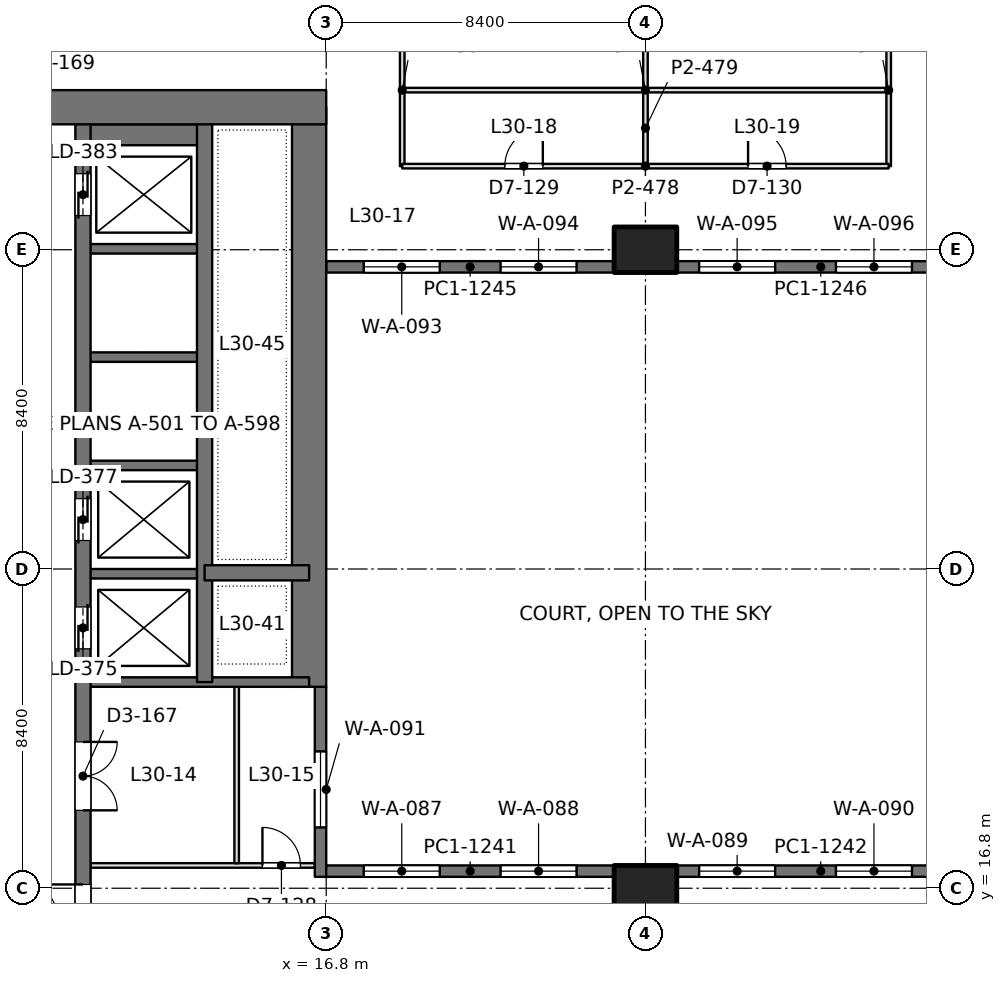
"""IFC4 building model, lengths in metres.
Left out: names, types, materials, properties, quantities, classifications, styles, units other than length and angle.
Written with IfcOpenShell. Run it as: python <this file> out.ifc"""

import sys

from ifc_helpers import new_model, si_unit, direction, frame, frame_2d, origin, origin_2d, place, context, subcontext, project, spatial, rectangle, extrude, element, fill, save


model = new_model("IFC4")
c1 = context("Model", 3, precision=1e-05, world=origin(), true_north=direction((0.0, 1.0)))
c2 = subcontext(c1, "Body", "Model", "MODEL_VIEW")
j1 = project(units=[si_unit("LENGTHUNIT", "METRE"), si_unit("PLANEANGLEUNIT", "RADIAN")], contexts=[c1])
p1 = place(None, origin())
s1 = spatial("IfcSite", under=j1, at=p1, CompositionType="ELEMENT")
p2 = place(p1, origin())
s2 = spatial("IfcBuilding", under=s1, at=p2, CompositionType="ELEMENT")
p3 = place(p2, frame((0.0, 0.0, 134.4)))
s3 = spatial("IfcBuildingStorey", under=s2, at=p3, CompositionType="ELEMENT", Elevation=134.4)
for number, where, z_axis, x_axis in (
    (1, (25.2, 16.8, 0.0), (0.0, 0.0, 1.0), (1.0, 0.0, 0.0)),
    (2, (25.2, 33.6, 0.0), (0.0, 0.0, 1.0), (1.0, 0.0, 0.0)),
):
    element("IfcColumn", number, at=place(p3, frame(where, z_axis=z_axis, x_axis=x_axis)), inside=s3, PredefinedType="COLUMN", context=c2, shape_type="SweptSolid", body=[
        extrude(rectangle(XDim=1.65, YDim=1.2, at=origin_2d()), origin(), (0.0, 0.0, 1.0), 4.2),
    ])
p4 = place(p3, frame((-1.2, 37.35, 0.0), z_axis=(0.0, 0.0, 1.0), x_axis=(1.0, 0.0, 0.0)))
e3 = element("IfcWall", 3, at=p4, inside=s3, PredefinedType="SHEAR", context=c2, shape_type="SweptSolid", body=[
    extrude(rectangle(XDim=18.0, YDim=0.9, at=frame_2d((9.0, 0.0))), origin(), (0.0, 0.0, 1.0), 4.2),
])
p5 = place(p4, frame((8.95, 0.0, 0.0)))
e4 = element("IfcOpeningElement", 4, at=p5, cuts=e3, PredefinedType="OPENING", context=c2, shape_type="SweptSolid", body=[
    extrude(rectangle(XDim=1.8, YDim=2.4, at=frame_2d((0.9, 1.2))), frame((0.0, 0.46, 0.0), z_axis=(0.0, -1.0, 0.0), x_axis=(1.0, 0.0, 0.0)), (0.0, 0.0, 1.0), 0.92),
])
p6 = place(p3, frame((16.35, 22.1, 0.0), z_axis=(0.0, 0.0, 1.0), x_axis=(0.0, 1.0, 0.0)))
e5 = element("IfcWall", 5, at=p6, inside=s3, PredefinedType="SHEAR", context=c2, shape_type="SweptSolid", body=[
    extrude(rectangle(XDim=15.25, YDim=0.9, at=frame_2d((7.625, 0.0))), origin(), (0.0, 0.0, 1.0), 4.2),
])
p7 = place(p3, frame((10.4, 13.05, 0.0), z_axis=(0.0, 0.0, 1.0), x_axis=(0.0, 1.0, 0.0)))
e6 = element("IfcWall", 6, at=p7, inside=s3, PredefinedType="SHEAR", context=c2, shape_type="SweptSolid", body=[
    extrude(rectangle(XDim=24.3, YDim=0.4, at=frame_2d((12.15, 0.0))), origin(), (0.0, 0.0, 1.0), 4.2),
])
p8 = place(p7, frame((10.05, 0.0, 0.0)))
e7 = element("IfcOpeningElement", 7, at=p8, cuts=e6, PredefinedType="OPENING", context=c2, shape_type="SweptSolid", body=[
    extrude(rectangle(XDim=1.1, YDim=2.2, at=frame_2d((0.55, 1.1))), frame((0.0, 0.21, 0.0), z_axis=(0.0, -1.0, 0.0), x_axis=(1.0, 0.0, 0.0)), (0.0, 0.0, 1.0), 0.42),
])
p9 = place(p7, frame((12.9, 0.0, 0.0)))
e8 = element("IfcOpeningElement", 8, at=p9, cuts=e6, PredefinedType="OPENING", context=c2, shape_type="SweptSolid", body=[
    extrude(rectangle(XDim=1.1, YDim=2.2, at=frame_2d((0.55, 1.1))), frame((0.0, 0.21, 0.0), z_axis=(0.0, -1.0, 0.0), x_axis=(1.0, 0.0, 0.0)), (0.0, 0.0, 1.0), 0.42),
])
p10 = place(p7, frame((21.45, 0.0, 0.0)))
e9 = element("IfcOpeningElement", 9, at=p10, cuts=e6, PredefinedType="OPENING", context=c2, shape_type="SweptSolid", body=[
    extrude(rectangle(XDim=1.1, YDim=2.2, at=frame_2d((0.55, 1.1))), frame((0.0, 0.21, 0.0), z_axis=(0.0, -1.0, 0.0), x_axis=(1.0, 0.0, 0.0)), (0.0, 0.0, 1.0), 0.42),
])
p11 = place(p7, frame((2.05, 0.0, 0.0)))
e10 = element("IfcOpeningElement", 10, at=p11, cuts=e6, PredefinedType="OPENING", context=c2, shape_type="SweptSolid", body=[
    extrude(rectangle(XDim=1.8, YDim=2.4, at=frame_2d((0.9, 1.2))), frame((0.0, 0.21, 0.0), z_axis=(0.0, -1.0, 0.0), x_axis=(1.0, 0.0, 0.0)), (0.0, 0.0, 1.0), 0.42),
])
p12 = place(p7, frame((5.8, 0.0, 0.0)))
e11 = element("IfcOpeningElement", 11, at=p12, cuts=e6, PredefinedType="OPENING", context=c2, shape_type="SweptSolid", body=[
    extrude(rectangle(XDim=1.8, YDim=2.4, at=frame_2d((0.9, 1.2))), frame((0.0, 0.21, 0.0), z_axis=(0.0, -1.0, 0.0), x_axis=(1.0, 0.0, 0.0)), (0.0, 0.0, 1.0), 0.42),
])
p13 = place(p3, frame((13.6, 22.225, 0.0), z_axis=(0.0, 0.0, 1.0), x_axis=(0.0, 1.0, 0.0)))
e12 = element("IfcWall", 12, at=p13, inside=s3, PredefinedType="SHEAR", context=c2, shape_type="SweptSolid", body=[
    extrude(rectangle(XDim=15.125, YDim=0.4, at=frame_2d((7.562, 0.0))), origin(), (0.0, 0.0, 1.0), 4.2),
])
p14 = place(p3, frame((13.6, 25.1, 0.0), z_axis=(0.0, 0.0, 1.0), x_axis=(1.0, 0.0, 0.0)))
e13 = element("IfcWall", 13, at=p14, inside=s3, PredefinedType="SHEAR", context=c2, shape_type="SweptSolid", body=[
    extrude(rectangle(XDim=2.75, YDim=0.4, at=frame_2d((1.375, 0.0))), origin(), (0.0, 0.0, 1.0), 4.2),
])
p15 = place(p3, frame((10.4, 22.225, 0.0), z_axis=(0.0, 0.0, 1.0), x_axis=(1.0, 0.0, 0.0)))
e14 = element("IfcWall", 14, at=p15, inside=s3, PredefinedType="SHEAR", context=c2, shape_type="SweptSolid", body=[
    extrude(rectangle(XDim=5.95, YDim=0.25, at=frame_2d((2.975, 0.0))), origin(), (0.0, 0.0, 1.0), 4.2),
])
for number, where, z_axis, x_axis in (
    (15, (10.4, 25.075, 0.0), (0.0, 0.0, 1.0), (1.0, 0.0, 0.0)),
    (16, (10.4, 27.925, 0.0), (0.0, 0.0, 1.0), (1.0, 0.0, 0.0)),
    (17, (10.4, 30.775, 0.0), (0.0, 0.0, 1.0), (1.0, 0.0, 0.0)),
    (18, (10.4, 33.625, 0.0), (0.0, 0.0, 1.0), (1.0, 0.0, 0.0)),
):
    element("IfcWall", number, at=place(p3, frame(where, z_axis=z_axis, x_axis=x_axis)), inside=s3, PredefinedType="SHEAR", context=c2, shape_type="SweptSolid", body=[
        extrude(rectangle(XDim=3.2, YDim=0.25, at=frame_2d((1.6, 0.0))), origin(), (0.0, 0.0, 1.0), 4.2),
    ])
p16 = place(p3, frame((10.4, 36.625, 0.0), z_axis=(0.0, 0.0, 1.0), x_axis=(1.0, 0.0, 0.0)))
e19 = element("IfcWall", 19, at=p16, inside=s3, PredefinedType="SHEAR", context=c2, shape_type="SweptSolid", body=[
    extrude(rectangle(XDim=3.2, YDim=0.55, at=frame_2d((1.6, 0.0))), origin(), (0.0, 0.0, 1.0), 4.2),
])
p17 = place(p3, frame((16.65, 17.1, 0.0), z_axis=(0.0, 0.0, 1.0), x_axis=(0.0, 1.0, 0.0)))
e20 = element("IfcWall", 20, at=p17, inside=s3, PredefinedType="SOLIDWALL", context=c2, shape_type="SweptSolid", body=[
    extrude(rectangle(XDim=5.0, YDim=0.3, at=frame_2d((2.5, 0.0))), origin(), (0.0, 0.0, 1.0), 4.05),
])
p18 = place(p17, frame((1.3, 0.0, 0.1)))
e21 = element("IfcOpeningElement", 21, at=p18, cuts=e20, PredefinedType="OPENING", context=c2, shape_type="SweptSolid", body=[
    extrude(rectangle(XDim=2.0, YDim=3.0, at=frame_2d((1.0, 1.5))), frame((0.0, 0.16, 0.0), z_axis=(0.0, -1.0, 0.0), x_axis=(1.0, 0.0, 0.0)), (0.0, 0.0, 1.0), 0.32),
])
p19 = place(p3, frame((16.8, 17.25, 0.0), z_axis=(0.0, 0.0, 1.0), x_axis=(1.0, 0.0, 0.0)))
e22 = element("IfcWall", 22, at=p19, inside=s3, PredefinedType="SOLIDWALL", context=c2, shape_type="SweptSolid", body=[
    extrude(rectangle(XDim=7.575, YDim=0.3, at=frame_2d((3.788, 0.0))), origin(), (0.0, 0.0, 1.0), 4.05),
])
p20 = place(p19, frame((0.988, 0.0, 0.1)))
e23 = element("IfcOpeningElement", 23, at=p20, cuts=e22, PredefinedType="OPENING", context=c2, shape_type="SweptSolid", body=[
    extrude(rectangle(XDim=2.0, YDim=3.0, at=frame_2d((1.0, 1.5))), frame((0.0, 0.16, 0.0), z_axis=(0.0, -1.0, 0.0), x_axis=(1.0, 0.0, 0.0)), (0.0, 0.0, 1.0), 0.32),
])
p21 = place(p19, frame((4.587, 0.0, 0.1)))
e24 = element("IfcOpeningElement", 24, at=p21, cuts=e22, PredefinedType="OPENING", context=c2, shape_type="SweptSolid", body=[
    extrude(rectangle(XDim=2.0, YDim=3.0, at=frame_2d((1.0, 1.5))), frame((0.0, 0.16, 0.0), z_axis=(0.0, -1.0, 0.0), x_axis=(1.0, 0.0, 0.0)), (0.0, 0.0, 1.0), 0.32),
])
p22 = place(p3, frame((26.025, 17.25, 0.0), z_axis=(0.0, 0.0, 1.0), x_axis=(1.0, 0.0, 0.0)))
e25 = element("IfcWall", 25, at=p22, inside=s3, PredefinedType="SOLIDWALL", context=c2, shape_type="SweptSolid", body=[
    extrude(rectangle(XDim=7.575, YDim=0.3, at=frame_2d((3.788, 0.0))), origin(), (0.0, 0.0, 1.0), 4.05),
])
p23 = place(p22, frame((0.587, 0.0, 0.1)))
e26 = element("IfcOpeningElement", 26, at=p23, cuts=e25, PredefinedType="OPENING", context=c2, shape_type="SweptSolid", body=[
    extrude(rectangle(XDim=2.0, YDim=3.0, at=frame_2d((1.0, 1.5))), frame((0.0, 0.16, 0.0), z_axis=(0.0, -1.0, 0.0), x_axis=(1.0, 0.0, 0.0)), (0.0, 0.0, 1.0), 0.32),
])
p24 = place(p22, frame((4.188, 0.0, 0.1)))
e27 = element("IfcOpeningElement", 27, at=p24, cuts=e25, PredefinedType="OPENING", context=c2, shape_type="SweptSolid", body=[
    extrude(rectangle(XDim=2.0, YDim=3.0, at=frame_2d((1.0, 1.5))), frame((0.0, 0.16, 0.0), z_axis=(0.0, -1.0, 0.0), x_axis=(1.0, 0.0, 0.0)), (0.0, 0.0, 1.0), 0.32),
])
p25 = place(p3, frame((16.8, 33.15, 0.0), z_axis=(0.0, 0.0, 1.0), x_axis=(1.0, 0.0, 0.0)))
e28 = element("IfcWall", 28, at=p25, inside=s3, PredefinedType="SOLIDWALL", context=c2, shape_type="SweptSolid", body=[
    extrude(rectangle(XDim=7.575, YDim=0.3, at=frame_2d((3.788, 0.0))), origin(), (0.0, 0.0, 1.0), 4.05),
])
p26 = place(p25, frame((0.988, 0.0, 0.1)))
e29 = element("IfcOpeningElement", 29, at=p26, cuts=e28, PredefinedType="OPENING", context=c2, shape_type="SweptSolid", body=[
    extrude(rectangle(XDim=2.0, YDim=3.0, at=frame_2d((1.0, 1.5))), frame((0.0, 0.16, 0.0), z_axis=(0.0, -1.0, 0.0), x_axis=(1.0, 0.0, 0.0)), (0.0, 0.0, 1.0), 0.32),
])
p27 = place(p25, frame((4.587, 0.0, 0.1)))
e30 = element("IfcOpeningElement", 30, at=p27, cuts=e28, PredefinedType="OPENING", context=c2, shape_type="SweptSolid", body=[
    extrude(rectangle(XDim=2.0, YDim=3.0, at=frame_2d((1.0, 1.5))), frame((0.0, 0.16, 0.0), z_axis=(0.0, -1.0, 0.0), x_axis=(1.0, 0.0, 0.0)), (0.0, 0.0, 1.0), 0.32),
])
p28 = place(p3, frame((26.025, 33.15, 0.0), z_axis=(0.0, 0.0, 1.0), x_axis=(1.0, 0.0, 0.0)))
e31 = element("IfcWall", 31, at=p28, inside=s3, PredefinedType="SOLIDWALL", context=c2, shape_type="SweptSolid", body=[
    extrude(rectangle(XDim=7.575, YDim=0.3, at=frame_2d((3.788, 0.0))), origin(), (0.0, 0.0, 1.0), 4.05),
])
p29 = place(p28, frame((0.587, 0.0, 0.1)))
e32 = element("IfcOpeningElement", 32, at=p29, cuts=e31, PredefinedType="OPENING", context=c2, shape_type="SweptSolid", body=[
    extrude(rectangle(XDim=2.0, YDim=3.0, at=frame_2d((1.0, 1.5))), frame((0.0, 0.16, 0.0), z_axis=(0.0, -1.0, 0.0), x_axis=(1.0, 0.0, 0.0)), (0.0, 0.0, 1.0), 0.32),
])
p30 = place(p28, frame((4.188, 0.0, 0.1)))
e33 = element("IfcOpeningElement", 33, at=p30, cuts=e31, PredefinedType="OPENING", context=c2, shape_type="SweptSolid", body=[
    extrude(rectangle(XDim=2.0, YDim=3.0, at=frame_2d((1.0, 1.5))), frame((0.0, 0.16, 0.0), z_axis=(0.0, -1.0, 0.0), x_axis=(1.0, 0.0, 0.0)), (0.0, 0.0, 1.0), 0.32),
])
p31 = place(p3, frame((10.598, 17.4, 0.0), z_axis=(0.0, 0.0, 1.0), x_axis=(1.0, 0.0, 0.0)))
e34 = element("IfcWall", 34, at=p31, inside=s3, PredefinedType="PARTITIONING", context=c2, shape_type="SweptSolid", body=[
    extrude(rectangle(XDim=5.904, YDim=0.12, at=frame_2d((2.952, 0.0))), origin(), (0.0, 0.0, 1.0), 3.55),
])
p32 = place(p31, frame((4.524, 0.0, 0.0)))
e35 = element("IfcOpeningElement", 35, at=p32, cuts=e34, PredefinedType="OPENING", context=c2, shape_type="SweptSolid", body=[
    extrude(rectangle(XDim=1.0, YDim=2.4, at=frame_2d((0.5, 1.2))), frame((0.0, 0.07, 0.0), z_axis=(0.0, -1.0, 0.0), x_axis=(1.0, 0.0, 0.0)), (0.0, 0.0, 1.0), 0.14),
])
p33 = place(p3, frame((14.444, 17.458, 0.0), z_axis=(0.0, 0.0, 1.0), x_axis=(0.0, 1.0, 0.0)))
e36 = element("IfcWall", 36, at=p33, inside=s3, PredefinedType="PARTITIONING", context=c2, shape_type="SweptSolid", body=[
    extrude(rectangle(XDim=4.644, YDim=0.12, at=frame_2d((2.322, 0.0))), origin(), (0.0, 0.0, 1.0), 3.6),
])
p34 = place(p3, frame((25.2, 37.858, 0.0), z_axis=(0.0, 0.0, 1.0), x_axis=(0.0, 1.0, 0.0)))
e37 = element("IfcWall", 37, at=p34, inside=s3, PredefinedType="PARTITIONING", context=c2, shape_type="SweptSolid", body=[
    extrude(rectangle(XDim=3.443, YDim=0.12, at=frame_2d((1.722, 0.0))), origin(), (0.0, 0.0, 1.0), 3.55),
])
for number, where, z_axis, x_axis in (
    (38, (18.8, 35.8, 0.0), (0.0, 0.0, 1.0), (0.0, 1.0, 0.0)),
    (39, (31.6, 35.8, 0.0), (0.0, 0.0, 1.0), (0.0, 1.0, 0.0)),
):
    element("IfcWall", number, at=place(p3, frame(where, z_axis=z_axis, x_axis=x_axis)), inside=s3, PredefinedType="PARTITIONING", context=c2, shape_type="SweptSolid", body=[
        extrude(rectangle(XDim=4.0, YDim=0.12, at=frame_2d((2.0, 0.0))), origin(), (0.0, 0.0, 1.0), 4.05),
    ])
p35 = place(p3, frame((25.2, 35.858, 0.0), z_axis=(0.0, 0.0, 1.0), x_axis=(0.0, 1.0, 0.0)))
e40 = element("IfcWall", 40, at=p35, inside=s3, PredefinedType="PARTITIONING", context=c2, shape_type="SweptSolid", body=[
    extrude(rectangle(XDim=1.884, YDim=0.12, at=frame_2d((0.942, 0.0))), origin(), (0.0, 0.0, 1.0), 3.55),
])
p36 = place(p3, frame((18.8, 35.8, 0.0), z_axis=(0.0, 0.0, 1.0), x_axis=(1.0, 0.0, 0.0)))
e41 = element("IfcWall", 41, at=p36, inside=s3, PredefinedType="PARTITIONING", context=c2, shape_type="SweptSolid", body=[
    extrude(rectangle(XDim=12.8, YDim=0.12, at=frame_2d((6.4, 0.0))), origin(), (0.0, 0.0, 1.0), 3.55),
])
p37 = place(p36, frame((2.7, 0.0, 0.0)))
e42 = element("IfcOpeningElement", 42, at=p37, cuts=e41, PredefinedType="OPENING", context=c2, shape_type="SweptSolid", body=[
    extrude(rectangle(XDim=1.0, YDim=2.4, at=frame_2d((0.5, 1.2))), frame((0.0, 0.07, 0.0), z_axis=(0.0, -1.0, 0.0), x_axis=(1.0, 0.0, 0.0)), (0.0, 0.0, 1.0), 0.14),
])
p38 = place(p36, frame((9.1, 0.0, 0.0)))
e43 = element("IfcOpeningElement", 43, at=p38, cuts=e41, PredefinedType="OPENING", context=c2, shape_type="SweptSolid", body=[
    extrude(rectangle(XDim=1.0, YDim=2.4, at=frame_2d((0.5, 1.2))), frame((0.0, 0.07, 0.0), z_axis=(0.0, -1.0, 0.0), x_axis=(1.0, 0.0, 0.0)), (0.0, 0.0, 1.0), 0.14),
])
p39 = place(p3, frame((18.858, 37.8, 0.0), z_axis=(0.0, 0.0, 1.0), x_axis=(1.0, 0.0, 0.0)))
e44 = element("IfcWall", 44, at=p39, inside=s3, PredefinedType="PARTITIONING", context=c2, shape_type="SweptSolid", body=[
    extrude(rectangle(XDim=12.684, YDim=0.12, at=frame_2d((6.342, 0.0))), origin(), (0.0, 0.0, 1.0), 3.55),
])
p40 = place(p18, origin())
e45 = element("IfcWindow", 45, at=p40, inside=s3, PartitioningType="SINGLE_PANEL", PredefinedType="WINDOW", context=c2, shape_type="SweptSolid", body=[
    extrude(rectangle(XDim=2.0, YDim=3.0, at=frame_2d((1.0, 1.5))), frame((0.0, 0.03, 0.0), z_axis=(0.0, -1.0, 0.0), x_axis=(1.0, 0.0, 0.0)), (0.0, 0.0, 1.0), 0.06),
])
fill(e21, e45)
p41 = place(p20, origin())
e46 = element("IfcWindow", 46, at=p41, inside=s3, PartitioningType="SINGLE_PANEL", PredefinedType="WINDOW", context=c2, shape_type="SweptSolid", body=[
    extrude(rectangle(XDim=2.0, YDim=3.0, at=frame_2d((1.0, 1.5))), frame((0.0, 0.03, 0.0), z_axis=(0.0, -1.0, 0.0), x_axis=(1.0, 0.0, 0.0)), (0.0, 0.0, 1.0), 0.06),
])
fill(e23, e46)
p42 = place(p21, origin())
e47 = element("IfcWindow", 47, at=p42, inside=s3, PartitioningType="SINGLE_PANEL", PredefinedType="WINDOW", context=c2, shape_type="SweptSolid", body=[
    extrude(rectangle(XDim=2.0, YDim=3.0, at=frame_2d((1.0, 1.5))), frame((0.0, 0.03, 0.0), z_axis=(0.0, -1.0, 0.0), x_axis=(1.0, 0.0, 0.0)), (0.0, 0.0, 1.0), 0.06),
])
fill(e24, e47)
p43 = place(p23, origin())
e48 = element("IfcWindow", 48, at=p43, inside=s3, PartitioningType="SINGLE_PANEL", PredefinedType="WINDOW", context=c2, shape_type="SweptSolid", body=[
    extrude(rectangle(XDim=2.0, YDim=3.0, at=frame_2d((1.0, 1.5))), frame((0.0, 0.03, 0.0), z_axis=(0.0, -1.0, 0.0), x_axis=(1.0, 0.0, 0.0)), (0.0, 0.0, 1.0), 0.06),
])
fill(e26, e48)
p44 = place(p24, origin())
e49 = element("IfcWindow", 49, at=p44, inside=s3, PartitioningType="SINGLE_PANEL", PredefinedType="WINDOW", context=c2, shape_type="SweptSolid", body=[
    extrude(rectangle(XDim=2.0, YDim=3.0, at=frame_2d((1.0, 1.5))), frame((0.0, 0.03, 0.0), z_axis=(0.0, -1.0, 0.0), x_axis=(1.0, 0.0, 0.0)), (0.0, 0.0, 1.0), 0.06),
])
fill(e27, e49)
p45 = place(p26, origin())
e50 = element("IfcWindow", 50, at=p45, inside=s3, PartitioningType="SINGLE_PANEL", PredefinedType="WINDOW", context=c2, shape_type="SweptSolid", body=[
    extrude(rectangle(XDim=2.0, YDim=3.0, at=frame_2d((1.0, 1.5))), frame((0.0, 0.03, 0.0), z_axis=(0.0, -1.0, 0.0), x_axis=(1.0, 0.0, 0.0)), (0.0, 0.0, 1.0), 0.06),
])
fill(e29, e50)
p46 = place(p27, origin())
e51 = element("IfcWindow", 51, at=p46, inside=s3, PartitioningType="SINGLE_PANEL", PredefinedType="WINDOW", context=c2, shape_type="SweptSolid", body=[
    extrude(rectangle(XDim=2.0, YDim=3.0, at=frame_2d((1.0, 1.5))), frame((0.0, 0.03, 0.0), z_axis=(0.0, -1.0, 0.0), x_axis=(1.0, 0.0, 0.0)), (0.0, 0.0, 1.0), 0.06),
])
fill(e30, e51)
p47 = place(p29, origin())
e52 = element("IfcWindow", 52, at=p47, inside=s3, PartitioningType="SINGLE_PANEL", PredefinedType="WINDOW", context=c2, shape_type="SweptSolid", body=[
    extrude(rectangle(XDim=2.0, YDim=3.0, at=frame_2d((1.0, 1.5))), frame((0.0, 0.03, 0.0), z_axis=(0.0, -1.0, 0.0), x_axis=(1.0, 0.0, 0.0)), (0.0, 0.0, 1.0), 0.06),
])
fill(e32, e52)
p48 = place(p30, origin())
e53 = element("IfcWindow", 53, at=p48, inside=s3, PartitioningType="SINGLE_PANEL", PredefinedType="WINDOW", context=c2, shape_type="SweptSolid", body=[
    extrude(rectangle(XDim=2.0, YDim=3.0, at=frame_2d((1.0, 1.5))), frame((0.0, 0.03, 0.0), z_axis=(0.0, -1.0, 0.0), x_axis=(1.0, 0.0, 0.0)), (0.0, 0.0, 1.0), 0.06),
])
fill(e33, e53)
p49 = place(p8, origin())
e54 = element("IfcDoor", 54, at=p49, inside=s3, OperationType="DOUBLE_DOOR_SLIDING", PredefinedType="DOOR", context=c2, shape_type="SweptSolid", body=[
    extrude(rectangle(XDim=1.1, YDim=2.2, at=frame_2d((0.55, 1.1))), frame((0.0, 0.025, 0.0), z_axis=(0.0, -1.0, 0.0), x_axis=(1.0, 0.0, 0.0)), (0.0, 0.0, 1.0), 0.05),
])
fill(e7, e54)
p50 = place(p9, origin())
e55 = element("IfcDoor", 55, at=p50, inside=s3, OperationType="DOUBLE_DOOR_SLIDING", PredefinedType="DOOR", context=c2, shape_type="SweptSolid", body=[
    extrude(rectangle(XDim=1.1, YDim=2.2, at=frame_2d((0.55, 1.1))), frame((0.0, 0.025, 0.0), z_axis=(0.0, -1.0, 0.0), x_axis=(1.0, 0.0, 0.0)), (0.0, 0.0, 1.0), 0.05),
])
fill(e8, e55)
p51 = place(p10, origin())
e56 = element("IfcDoor", 56, at=p51, inside=s3, OperationType="DOUBLE_DOOR_SLIDING", PredefinedType="DOOR", context=c2, shape_type="SweptSolid", body=[
    extrude(rectangle(XDim=1.1, YDim=2.2, at=frame_2d((0.55, 1.1))), frame((0.0, 0.025, 0.0), z_axis=(0.0, -1.0, 0.0), x_axis=(1.0, 0.0, 0.0)), (0.0, 0.0, 1.0), 0.05),
])
fill(e9, e56)
p52 = place(p11, origin())
e57 = element("IfcDoor", 57, at=p52, inside=s3, OperationType="DOUBLE_DOOR_SINGLE_SWING", PredefinedType="DOOR", context=c2, shape_type="SweptSolid", body=[
    extrude(rectangle(XDim=1.8, YDim=2.4, at=frame_2d((0.9, 1.2))), frame((0.0, 0.025, 0.0), z_axis=(0.0, -1.0, 0.0), x_axis=(1.0, 0.0, 0.0)), (0.0, 0.0, 1.0), 0.05),
])
fill(e10, e57)
p53 = place(p12, frame((1.8, 0.0, 0.0), z_axis=(0.0, 0.0, 1.0), x_axis=(-1.0, 0.0, 0.0)))
e58 = element("IfcDoor", 58, at=p53, inside=s3, OperationType="DOUBLE_DOOR_SINGLE_SWING", PredefinedType="DOOR", context=c2, shape_type="SweptSolid", body=[
    extrude(rectangle(XDim=1.8, YDim=2.4, at=frame_2d((0.9, 1.2))), frame((0.0, 0.025, 0.0), z_axis=(0.0, -1.0, 0.0), x_axis=(1.0, 0.0, 0.0)), (0.0, 0.0, 1.0), 0.05),
])
fill(e11, e58)
p54 = place(p32, origin())
e59 = element("IfcDoor", 59, at=p54, inside=s3, OperationType="SINGLE_SWING_LEFT", PredefinedType="DOOR", context=c2, shape_type="SweptSolid", body=[
    extrude(rectangle(XDim=1.0, YDim=2.4, at=frame_2d((0.5, 1.2))), frame((0.0, 0.025, 0.0), z_axis=(0.0, -1.0, 0.0), x_axis=(1.0, 0.0, 0.0)), (0.0, 0.0, 1.0), 0.05),
])
fill(e35, e59)
p55 = place(p37, origin())
e60 = element("IfcDoor", 60, at=p55, inside=s3, OperationType="SINGLE_SWING_RIGHT", PredefinedType="DOOR", context=c2, shape_type="SweptSolid", body=[
    extrude(rectangle(XDim=1.0, YDim=2.4, at=frame_2d((0.5, 1.2))), frame((0.0, 0.025, 0.0), z_axis=(0.0, -1.0, 0.0), x_axis=(1.0, 0.0, 0.0)), (0.0, 0.0, 1.0), 0.05),
])
fill(e42, e60)
p56 = place(p38, origin())
e61 = element("IfcDoor", 61, at=p56, inside=s3, OperationType="SINGLE_SWING_LEFT", PredefinedType="DOOR", context=c2, shape_type="SweptSolid", body=[
    extrude(rectangle(XDim=1.0, YDim=2.4, at=frame_2d((0.5, 1.2))), frame((0.0, 0.025, 0.0), z_axis=(0.0, -1.0, 0.0), x_axis=(1.0, 0.0, 0.0)), (0.0, 0.0, 1.0), 0.05),
])
fill(e43, e61)
save(model, sys.argv[1])
